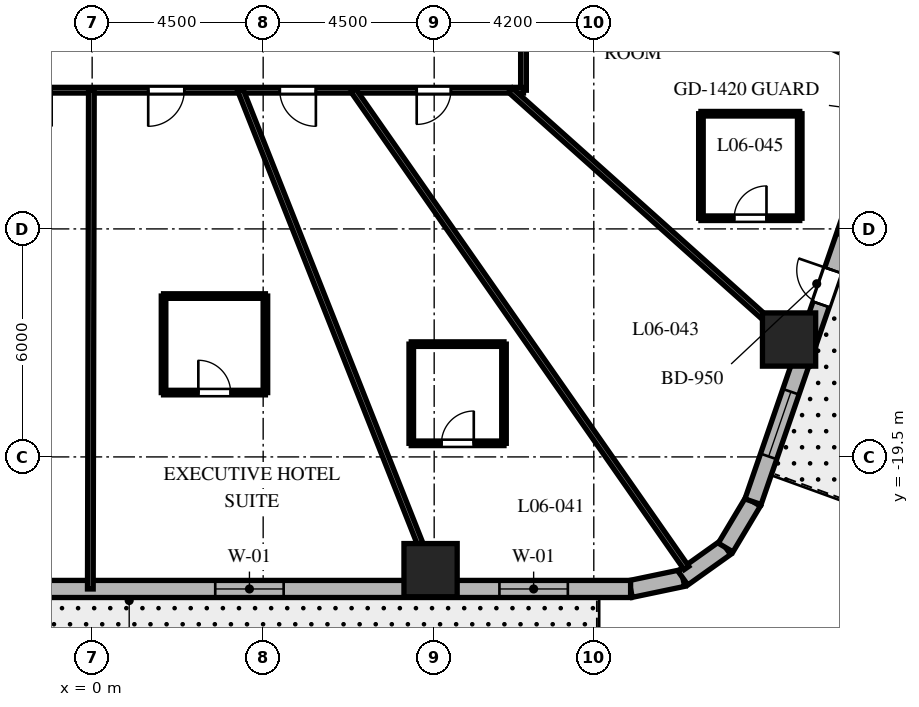
"""IFC4 building model, lengths in metres.
Left out: names, types, materials, properties, quantities, classifications, styles, units other than length and angle.
Written with IfcOpenShell. Run it as: python <this file> out.ifc"""

import sys

from ifc_helpers import new_model, si_unit, direction, frame, frame_2d, origin, origin_2d, place, context, subcontext, project, spatial, rectangle, extrude, element, fill, save


model = new_model("IFC4")
c1 = context("Model", 3, precision=1e-05, world=origin(), true_north=direction((0.0, 1.0)))
c2 = subcontext(c1, "Body", "Model", "MODEL_VIEW")
j1 = project(units=[si_unit("LENGTHUNIT", "METRE"), si_unit("PLANEANGLEUNIT", "RADIAN")], contexts=[c1])
p1 = place(None, origin())
s1 = spatial("IfcSite", under=j1, at=p1, CompositionType="ELEMENT")
p2 = place(p1, origin())
s2 = spatial("IfcBuilding", under=s1, at=p2, CompositionType="ELEMENT")
p3 = place(p2, frame((0.0, 0.0, 34.2)))
s3 = spatial("IfcBuildingStorey", under=s2, at=p3, CompositionType="ELEMENT", Elevation=34.2)
for number, where, z_axis, x_axis in (
    (1, (8.905, -22.48, 0.0), (0.0, 0.0, 1.0), (1.0, 0.0, 0.0)),
    (2, (18.338, -16.411, 0.0), (0.0, 0.0, 1.0), (1.0, 0.0, 0.0)),
):
    element("IfcColumn", number, at=place(p3, frame(where, z_axis=z_axis, x_axis=x_axis)), inside=s3, PredefinedType="COLUMN", context=c2, shape_type="SweptSolid", body=[
        extrude(rectangle(XDim=1.4, YDim=1.4, at=origin_2d()), origin(), (0.0, 0.0, 1.0), 3.7),
    ])
p4 = place(p3, frame((14.168, -22.975, 0.0), z_axis=(0.0, 0.0, 1.0), x_axis=(0.978770371074, 0.204959900243, 0.0)))
e3 = element("IfcWall", 3, at=p4, inside=s3, PredefinedType="SOLIDWALL", context=c2, shape_type="SweptSolid", body=[
    extrude(rectangle(XDim=1.406, YDim=0.45, at=frame_2d((0.703, 0.0))), origin(), (0.0, 0.0, 1.0), 3.4),
])
p5 = place(p3, frame((15.544, -22.687, 0.0), z_axis=(0.0, 0.0, 1.0), x_axis=(0.814210854316, 0.580569276412, 0.0)))
e4 = element("IfcWall", 4, at=p5, inside=s3, PredefinedType="SOLIDWALL", context=c2, shape_type="SweptSolid", body=[
    extrude(rectangle(XDim=1.381, YDim=0.45, at=frame_2d((0.691, 0.0))), origin(), (0.0, 0.0, 1.0), 3.4),
])
p6 = place(p3, frame((16.669, -21.885, 0.0), z_axis=(0.0, 0.0, 1.0), x_axis=(0.512936712947, 0.858426425799, 0.0)))
e5 = element("IfcWall", 5, at=p6, inside=s3, PredefinedType="SOLIDWALL", context=c2, shape_type="SweptSolid", body=[
    extrude(rectangle(XDim=1.406, YDim=0.45, at=frame_2d((0.703, 0.0))), origin(), (0.0, 0.0, 1.0), 3.4),
])
p7 = place(p3, frame((-12.221, -22.975, 0.0), z_axis=(0.0, 0.0, 1.0), x_axis=(1.0, 0.0, 0.0)))
e6 = element("IfcWall", 6, at=p7, inside=s3, PredefinedType="SOLIDWALL", context=c2, shape_type="SweptSolid", body=[
    extrude(rectangle(XDim=26.389, YDim=0.45, at=frame_2d((13.195, 0.0))), origin(), (0.0, 0.0, 1.0), 3.4),
])
p8 = place(p7, frame((2.799, 0.0, 0.0)))
e7 = element("IfcOpeningElement", 7, at=p8, cuts=e6, PredefinedType="OPENING", context=c2, shape_type="SweptSolid", body=[
    extrude(rectangle(XDim=1.0, YDim=2.15, at=frame_2d((0.5, 1.075))), frame((0.0, 0.235, 0.0), z_axis=(0.0, -1.0, 0.0), x_axis=(1.0, 0.0, 0.0)), (0.0, 0.0, 1.0), 0.47),
])
p9 = place(p7, frame((8.11, 0.0, 0.8)))
e8 = element("IfcOpeningElement", 8, at=p9, cuts=e6, PredefinedType="OPENING", context=c2, shape_type="SweptSolid", body=[
    extrude(rectangle(XDim=1.8, YDim=1.8, at=frame_2d((0.9, 0.9))), frame((0.0, 0.235, 0.0), z_axis=(0.0, -1.0, 0.0), x_axis=(1.0, 0.0, 0.0)), (0.0, 0.0, 1.0), 0.47),
])
p10 = place(p7, frame((15.46, 0.0, 0.8)))
e9 = element("IfcOpeningElement", 9, at=p10, cuts=e6, PredefinedType="OPENING", context=c2, shape_type="SweptSolid", body=[
    extrude(rectangle(XDim=1.8, YDim=1.8, at=frame_2d((0.9, 0.9))), frame((0.0, 0.235, 0.0), z_axis=(0.0, -1.0, 0.0), x_axis=(1.0, 0.0, 0.0)), (0.0, 0.0, 1.0), 0.47),
])
p11 = place(p7, frame((22.938, 0.0, 0.8)))
e10 = element("IfcOpeningElement", 10, at=p11, cuts=e6, PredefinedType="OPENING", context=c2, shape_type="SweptSolid", body=[
    extrude(rectangle(XDim=1.8, YDim=1.8, at=frame_2d((0.9, 0.9))), frame((0.0, 0.235, 0.0), z_axis=(0.0, -1.0, 0.0), x_axis=(1.0, 0.0, 0.0)), (0.0, 0.0, 1.0), 0.47),
])
p12 = place(p3, frame((17.39, -20.678, 0.0), z_axis=(0.0, 0.0, 1.0), x_axis=(0.326068018294, 0.945346310854, 0.0)))
e11 = element("IfcWall", 11, at=p12, inside=s3, PredefinedType="SOLIDWALL", context=c2, shape_type="SweptSolid", body=[
    extrude(rectangle(XDim=21.793, YDim=0.45, at=frame_2d((10.896, 0.0))), origin(), (0.0, 0.0, 1.0), 3.4),
])
p13 = place(p12, frame((5.493, 0.0, 0.0)))
e12 = element("IfcOpeningElement", 12, at=p13, cuts=e11, PredefinedType="OPENING", context=c2, shape_type="SweptSolid", body=[
    extrude(rectangle(XDim=0.95, YDim=2.15, at=frame_2d((0.475, 1.075))), frame((0.0, 0.235, 0.0), z_axis=(0.0, -1.0, 0.0), x_axis=(1.0, 0.0, 0.0)), (0.0, 0.0, 1.0), 0.47),
])
p14 = place(p12, frame((1.26, 0.0, 0.8)))
e13 = element("IfcOpeningElement", 13, at=p14, cuts=e11, PredefinedType="OPENING", context=c2, shape_type="SweptSolid", body=[
    extrude(rectangle(XDim=1.8, YDim=1.8, at=frame_2d((0.9, 0.9))), frame((0.0, 0.235, 0.0), z_axis=(0.0, -1.0, 0.0), x_axis=(1.0, 0.0, 0.0)), (0.0, 0.0, 1.0), 0.47),
])
p15 = place(p12, frame((7.363, 0.0, 0.8)))
e14 = element("IfcOpeningElement", 14, at=p15, cuts=e11, PredefinedType="OPENING", context=c2, shape_type="SweptSolid", body=[
    extrude(rectangle(XDim=1.8, YDim=1.8, at=frame_2d((0.9, 0.9))), frame((0.0, 0.235, 0.0), z_axis=(0.0, -1.0, 0.0), x_axis=(1.0, 0.0, 0.0)), (0.0, 0.0, 1.0), 0.47),
])
p16 = place(p12, frame((13.518, 0.0, 0.8)))
e15 = element("IfcOpeningElement", 15, at=p16, cuts=e11, PredefinedType="OPENING", context=c2, shape_type="SweptSolid", body=[
    extrude(rectangle(XDim=1.8, YDim=1.8, at=frame_2d((0.9, 0.9))), frame((0.0, 0.235, 0.0), z_axis=(0.0, -1.0, 0.0), x_axis=(1.0, 0.0, 0.0)), (0.0, 0.0, 1.0), 0.47),
])
p17 = place(p12, frame((18.68, 0.0, 0.8)))
e16 = element("IfcOpeningElement", 16, at=p17, cuts=e11, PredefinedType="OPENING", context=c2, shape_type="SweptSolid", body=[
    extrude(rectangle(XDim=1.8, YDim=1.8, at=frame_2d((0.9, 0.9))), frame((0.0, 0.235, 0.0), z_axis=(0.0, -1.0, 0.0), x_axis=(1.0, 0.0, 0.0)), (0.0, 0.0, 1.0), 0.47),
])
p18 = place(p3, frame((11.35, 9.85, 0.0), z_axis=(0.0, 0.0, 1.0), x_axis=(0.0, -1.0, 0.0)))
e17 = element("IfcWall", 17, at=p18, inside=s3, PredefinedType="PARTITIONING", context=c2, shape_type="SweptSolid", body=[
    extrude(rectangle(XDim=19.7, YDim=0.15, at=frame_2d((9.85, 0.0))), origin(), (0.0, 0.0, 1.0), 2.84),
])
p19 = place(p18, frame((4.461, 0.0, 0.0)))
e18 = element("IfcOpeningElement", 18, at=p19, cuts=e17, PredefinedType="OPENING", context=c2, shape_type="SweptSolid", body=[
    extrude(rectangle(XDim=0.95, YDim=2.03, at=frame_2d((0.475, 1.015))), frame((0.0, 0.085, 0.0), z_axis=(0.0, -1.0, 0.0), x_axis=(1.0, 0.0, 0.0)), (0.0, 0.0, 1.0), 0.17),
])
p20 = place(p18, frame((1.221, 0.0, 0.0)))
e19 = element("IfcOpeningElement", 19, at=p20, cuts=e17, PredefinedType="OPENING", context=c2, shape_type="SweptSolid", body=[
    extrude(rectangle(XDim=0.95, YDim=2.03, at=frame_2d((0.475, 1.015))), frame((0.0, 0.085, 0.0), z_axis=(0.0, -1.0, 0.0), x_axis=(1.0, 0.0, 0.0)), (0.0, 0.0, 1.0), 0.17),
])
p21 = place(p18, frame((16.714, 0.0, 0.0)))
e20 = element("IfcOpeningElement", 20, at=p21, cuts=e17, PredefinedType="OPENING", context=c2, shape_type="SweptSolid", body=[
    extrude(rectangle(XDim=0.95, YDim=2.03, at=frame_2d((0.475, 1.015))), frame((0.0, 0.085, 0.0), z_axis=(0.0, -1.0, 0.0), x_axis=(1.0, 0.0, 0.0)), (0.0, 0.0, 1.0), 0.17),
])
p22 = place(p18, frame((12.932, 0.0, 0.0)))
e21 = element("IfcOpeningElement", 21, at=p22, cuts=e17, PredefinedType="OPENING", context=c2, shape_type="SweptSolid", body=[
    extrude(rectangle(XDim=0.95, YDim=2.03, at=frame_2d((0.475, 1.015))), frame((0.0, 0.085, 0.0), z_axis=(0.0, -1.0, 0.0), x_axis=(1.0, 0.0, 0.0)), (0.0, 0.0, 1.0), 0.17),
])
p23 = place(p18, frame((8.838, 0.0, 0.0)))
e22 = element("IfcOpeningElement", 22, at=p23, cuts=e17, PredefinedType="OPENING", context=c2, shape_type="SweptSolid", body=[
    extrude(rectangle(XDim=0.95, YDim=2.03, at=frame_2d((0.475, 1.015))), frame((0.0, 0.085, 0.0), z_axis=(0.0, -1.0, 0.0), x_axis=(1.0, 0.0, 0.0)), (0.0, 0.0, 1.0), 0.17),
])
p24 = place(p3, frame((11.35, -9.85, 0.0), z_axis=(0.0, 0.0, 1.0), x_axis=(-1.0, 0.0, 0.0)))
e23 = element("IfcWall", 23, at=p24, inside=s3, PredefinedType="PARTITIONING", context=c2, shape_type="SweptSolid", body=[
    extrude(rectangle(XDim=22.7, YDim=0.15, at=frame_2d((11.35, 0.0))), origin(), (0.0, 0.0, 1.0), 2.84),
])
p25 = place(p24, frame((18.436, 0.0, 0.0)))
e24 = element("IfcOpeningElement", 24, at=p25, cuts=e23, PredefinedType="OPENING", context=c2, shape_type="SweptSolid", body=[
    extrude(rectangle(XDim=0.95, YDim=2.03, at=frame_2d((0.475, 1.015))), frame((0.0, 0.085, 0.0), z_axis=(0.0, -1.0, 0.0), x_axis=(1.0, 0.0, 0.0)), (0.0, 0.0, 1.0), 0.17),
])
p26 = place(p24, frame((15.176, 0.0, 0.0)))
e25 = element("IfcOpeningElement", 25, at=p26, cuts=e23, PredefinedType="OPENING", context=c2, shape_type="SweptSolid", body=[
    extrude(rectangle(XDim=0.9, YDim=2.03, at=frame_2d((0.45, 1.015))), frame((0.0, 0.085, 0.0), z_axis=(0.0, -1.0, 0.0), x_axis=(1.0, 0.0, 0.0)), (0.0, 0.0, 1.0), 0.17),
])
p27 = place(p24, frame((12.415, 0.0, 0.0)))
e26 = element("IfcOpeningElement", 26, at=p27, cuts=e23, PredefinedType="OPENING", context=c2, shape_type="SweptSolid", body=[
    extrude(rectangle(XDim=0.95, YDim=2.03, at=frame_2d((0.475, 1.015))), frame((0.0, 0.085, 0.0), z_axis=(0.0, -1.0, 0.0), x_axis=(1.0, 0.0, 0.0)), (0.0, 0.0, 1.0), 0.17),
])
p28 = place(p24, frame((8.925, 0.0, 0.0)))
e27 = element("IfcOpeningElement", 27, at=p28, cuts=e23, PredefinedType="OPENING", context=c2, shape_type="SweptSolid", body=[
    extrude(rectangle(XDim=0.95, YDim=2.03, at=frame_2d((0.475, 1.015))), frame((0.0, 0.085, 0.0), z_axis=(0.0, -1.0, 0.0), x_axis=(1.0, 0.0, 0.0)), (0.0, 0.0, 1.0), 0.17),
])
p29 = place(p24, frame((5.463, 0.0, 0.0)))
e28 = element("IfcOpeningElement", 28, at=p29, cuts=e23, PredefinedType="OPENING", context=c2, shape_type="SweptSolid", body=[
    extrude(rectangle(XDim=0.95, YDim=2.03, at=frame_2d((0.475, 1.015))), frame((0.0, 0.085, 0.0), z_axis=(0.0, -1.0, 0.0), x_axis=(1.0, 0.0, 0.0)), (0.0, 0.0, 1.0), 0.17),
])
p30 = place(p24, frame((1.91, 0.0, 0.0)))
e29 = element("IfcOpeningElement", 29, at=p30, cuts=e23, PredefinedType="OPENING", context=c2, shape_type="SweptSolid", body=[
    extrude(rectangle(XDim=0.9, YDim=2.03, at=frame_2d((0.45, 1.015))), frame((0.0, 0.085, 0.0), z_axis=(0.0, -1.0, 0.0), x_axis=(1.0, 0.0, 0.0)), (0.0, 0.0, 1.0), 0.17),
])
p31 = place(p3, frame((-0.021, -9.85, 0.0), z_axis=(0.0, 0.0, 1.0), x_axis=(-0.002064727742, -0.999997868447, 0.0)))
e30 = element("IfcWall", 30, at=p31, inside=s3, PredefinedType="PARTITIONING", context=c2, shape_type="SweptSolid", body=[
    extrude(rectangle(XDim=13.125, YDim=0.15, at=frame_2d((6.562, 0.0))), origin(), (0.0, 0.0, 1.0), 2.54),
])
p32 = place(p3, frame((3.902, -9.85, 0.0), z_axis=(0.0, 0.0, 1.0), x_axis=(0.36828765711, -0.929711891728, 0.0)))
e31 = element("IfcWall", 31, at=p32, inside=s3, PredefinedType="PARTITIONING", context=c2, shape_type="SweptSolid", body=[
    extrude(rectangle(XDim=14.117, YDim=0.15, at=frame_2d((7.059, 0.0))), origin(), (0.0, 0.0, 1.0), 2.54),
])
p33 = place(p3, frame((6.869, -9.85, 0.0), z_axis=(0.0, 0.0, 1.0), x_axis=(0.572039834497, -0.820225839479, 0.0)))
e32 = element("IfcWall", 32, at=p33, inside=s3, PredefinedType="PARTITIONING", context=c2, shape_type="SweptSolid", body=[
    extrude(rectangle(XDim=15.329, YDim=0.15, at=frame_2d((7.665, 0.0))), origin(), (0.0, 0.0, 1.0), 2.54),
])
p34 = place(p3, frame((11.007, -9.85, 0.0), z_axis=(0.0, 0.0, 1.0), x_axis=(0.745177305978, -0.666866390407, 0.0)))
e33 = element("IfcWall", 33, at=p34, inside=s3, PredefinedType="PARTITIONING", context=c2, shape_type="SweptSolid", body=[
    extrude(rectangle(XDim=10.375, YDim=0.15, at=frame_2d((5.188, 0.0))), origin(), (0.0, 0.0, 1.0), 2.54),
])
p35 = place(p3, frame((11.35, -5.068, 0.0), z_axis=(0.0, 0.0, 1.0), x_axis=(0.913107192911, -0.407719577963, 0.0)))
e34 = element("IfcWall", 34, at=p35, inside=s3, PredefinedType="PARTITIONING", context=c2, shape_type="SweptSolid", body=[
    extrude(rectangle(XDim=10.841, YDim=0.15, at=frame_2d((5.421, 0.0))), origin(), (0.0, 0.0, 1.0), 2.54),
])
p36 = place(p3, frame((1.879, -17.807, 0.0), z_axis=(0.0, 0.0, 1.0), x_axis=(1.0, 0.0, 0.0)))
e35 = element("IfcWall", 35, at=p36, inside=s3, PredefinedType="PARTITIONING", context=c2, shape_type="SweptSolid", body=[
    extrude(rectangle(XDim=2.68, YDim=0.12, at=frame_2d((1.34, 0.0))), origin(), (0.0, 0.0, 1.0), 2.841),
])
p37 = place(p36, frame((0.915, 0.0, 0.0)))
e36 = element("IfcOpeningElement", 36, at=p37, cuts=e35, PredefinedType="OPENING", context=c2, shape_type="SweptSolid", body=[
    extrude(rectangle(XDim=0.85, YDim=2.03, at=frame_2d((0.425, 1.015))), frame((0.0, 0.07, 0.0), z_axis=(0.0, -1.0, 0.0), x_axis=(1.0, 0.0, 0.0)), (0.0, 0.0, 1.0), 0.14),
])
p38 = place(p3, frame((4.559, -17.807, 0.0), z_axis=(0.0, 0.0, 1.0), x_axis=(0.0, 1.0, 0.0)))
e37 = element("IfcWall", 37, at=p38, inside=s3, PredefinedType="PARTITIONING", context=c2, shape_type="SweptSolid", body=[
    extrude(rectangle(XDim=2.54, YDim=0.12, at=frame_2d((1.27, 0.0))), origin(), (0.0, 0.0, 1.0), 2.841),
])
p39 = place(p3, frame((4.559, -15.267, 0.0), z_axis=(0.0, 0.0, 1.0), x_axis=(-1.0, 0.0, 0.0)))
e38 = element("IfcWall", 38, at=p39, inside=s3, PredefinedType="PARTITIONING", context=c2, shape_type="SweptSolid", body=[
    extrude(rectangle(XDim=2.68, YDim=0.12, at=frame_2d((1.34, 0.0))), origin(), (0.0, 0.0, 1.0), 3.4),
])
p40 = place(p3, frame((1.879, -15.267, 0.0), z_axis=(0.0, 0.0, 1.0), x_axis=(0.0, -1.0, 0.0)))
e39 = element("IfcWall", 39, at=p40, inside=s3, PredefinedType="PARTITIONING", context=c2, shape_type="SweptSolid", body=[
    extrude(rectangle(XDim=2.54, YDim=0.12, at=frame_2d((1.27, 0.0))), origin(), (0.0, 0.0, 1.0), 2.841),
])
p41 = place(p3, frame((8.397, -19.142, 0.0), z_axis=(0.0, 0.0, 1.0), x_axis=(1.0, 0.0, 0.0)))
e40 = element("IfcWall", 40, at=p41, inside=s3, PredefinedType="PARTITIONING", context=c2, shape_type="SweptSolid", body=[
    extrude(rectangle(XDim=2.44, YDim=0.12, at=frame_2d((1.22, 0.0))), origin(), (0.0, 0.0, 1.0), 2.84),
])
p42 = place(p41, frame((0.795, 0.0, 0.0)))
e41 = element("IfcOpeningElement", 41, at=p42, cuts=e40, PredefinedType="OPENING", context=c2, shape_type="SweptSolid", body=[
    extrude(rectangle(XDim=0.85, YDim=2.03, at=frame_2d((0.425, 1.015))), frame((0.0, 0.07, 0.0), z_axis=(0.0, -1.0, 0.0), x_axis=(1.0, 0.0, 0.0)), (0.0, 0.0, 1.0), 0.14),
])
p43 = place(p3, frame((10.837, -19.142, 0.0), z_axis=(0.0, 0.0, 1.0), x_axis=(0.0, 1.0, 0.0)))
e42 = element("IfcWall", 42, at=p43, inside=s3, PredefinedType="PARTITIONING", context=c2, shape_type="SweptSolid", body=[
    extrude(rectangle(XDim=2.61, YDim=0.12, at=frame_2d((1.305, 0.0))), origin(), (0.0, 0.0, 1.0), 2.927),
])
p44 = place(p3, frame((10.837, -16.532, 0.0), z_axis=(0.0, 0.0, 1.0), x_axis=(-1.0, 0.0, 0.0)))
e43 = element("IfcWall", 43, at=p44, inside=s3, PredefinedType="PARTITIONING", context=c2, shape_type="SweptSolid", body=[
    extrude(rectangle(XDim=2.44, YDim=0.12, at=frame_2d((1.22, 0.0))), origin(), (0.0, 0.0, 1.0), 2.84),
])
p45 = place(p3, frame((8.397, -16.532, 0.0), z_axis=(0.0, 0.0, 1.0), x_axis=(0.0, -1.0, 0.0)))
e44 = element("IfcWall", 44, at=p45, inside=s3, PredefinedType="PARTITIONING", context=c2, shape_type="SweptSolid", body=[
    extrude(rectangle(XDim=2.61, YDim=0.12, at=frame_2d((1.305, 0.0))), origin(), (0.0, 0.0, 1.0), 2.841),
])
p46 = place(p3, frame((16.019, -13.219, 0.0), z_axis=(0.0, 0.0, 1.0), x_axis=(1.0, 0.0, 0.0)))
e45 = element("IfcWall", 45, at=p46, inside=s3, PredefinedType="PARTITIONING", context=c2, shape_type="SweptSolid", body=[
    extrude(rectangle(XDim=2.6, YDim=0.12, at=frame_2d((1.3, 0.0))), origin(), (0.0, 0.0, 1.0), 3.4),
])
p47 = place(p46, frame((0.875, 0.0, 0.0)))
e46 = element("IfcOpeningElement", 46, at=p47, cuts=e45, PredefinedType="OPENING", context=c2, shape_type="SweptSolid", body=[
    extrude(rectangle(XDim=0.85, YDim=2.03, at=frame_2d((0.425, 1.015))), frame((0.0, 0.07, 0.0), z_axis=(0.0, -1.0, 0.0), x_axis=(1.0, 0.0, 0.0)), (0.0, 0.0, 1.0), 0.14),
])
p48 = place(p3, frame((18.619, -13.219, 0.0), z_axis=(0.0, 0.0, 1.0), x_axis=(0.0, 1.0, 0.0)))
e47 = element("IfcWall", 47, at=p48, inside=s3, PredefinedType="PARTITIONING", context=c2, shape_type="SweptSolid", body=[
    extrude(rectangle(XDim=2.75, YDim=0.12, at=frame_2d((1.375, 0.0))), origin(), (0.0, 0.0, 1.0), 3.4),
])
p49 = place(p3, frame((18.619, -10.469, 0.0), z_axis=(0.0, 0.0, 1.0), x_axis=(-1.0, 0.0, 0.0)))
e48 = element("IfcWall", 48, at=p49, inside=s3, PredefinedType="PARTITIONING", context=c2, shape_type="SweptSolid", body=[
    extrude(rectangle(XDim=2.6, YDim=0.12, at=frame_2d((1.3, 0.0))), origin(), (0.0, 0.0, 1.0), 2.972),
])
p50 = place(p3, frame((16.019, -10.469, 0.0), z_axis=(0.0, 0.0, 1.0), x_axis=(0.0, -1.0, 0.0)))
e49 = element("IfcWall", 49, at=p50, inside=s3, PredefinedType="PARTITIONING", context=c2, shape_type="SweptSolid", body=[
    extrude(rectangle(XDim=2.75, YDim=0.12, at=frame_2d((1.375, 0.0))), origin(), (0.0, 0.0, 1.0), 2.972),
])
p51 = place(p10, origin())
e50 = element("IfcWindow", 50, at=p51, inside=s3, PartitioningType="SINGLE_PANEL", PredefinedType="WINDOW", context=c2, shape_type="SweptSolid", body=[
    extrude(rectangle(XDim=1.8, YDim=1.8, at=frame_2d((0.9, 0.9))), frame((0.0, 0.03, 0.0), z_axis=(0.0, -1.0, 0.0), x_axis=(1.0, 0.0, 0.0)), (0.0, 0.0, 1.0), 0.06),
])
fill(e9, e50)
p52 = place(p11, origin())
e51 = element("IfcWindow", 51, at=p52, inside=s3, PartitioningType="SINGLE_PANEL", PredefinedType="WINDOW", context=c2, shape_type="SweptSolid", body=[
    extrude(rectangle(XDim=1.8, YDim=1.8, at=frame_2d((0.9, 0.9))), frame((0.0, 0.03, 0.0), z_axis=(0.0, -1.0, 0.0), x_axis=(1.0, 0.0, 0.0)), (0.0, 0.0, 1.0), 0.06),
])
fill(e10, e51)
p53 = place(p13, origin())
e52 = element("IfcDoor", 52, at=p53, inside=s3, OperationType="SINGLE_SWING_RIGHT", PredefinedType="DOOR", context=c2, shape_type="SweptSolid", body=[
    extrude(rectangle(XDim=0.95, YDim=2.15, at=frame_2d((0.475, 1.075))), frame((0.0, 0.025, 0.0), z_axis=(0.0, -1.0, 0.0), x_axis=(1.0, 0.0, 0.0)), (0.0, 0.0, 1.0), 0.05),
])
fill(e12, e52)
p54 = place(p14, origin())
e53 = element("IfcWindow", 53, at=p54, inside=s3, PartitioningType="SINGLE_PANEL", PredefinedType="WINDOW", context=c2, shape_type="SweptSolid", body=[
    extrude(rectangle(XDim=1.8, YDim=1.8, at=frame_2d((0.9, 0.9))), frame((0.0, 0.03, 0.0), z_axis=(0.0, -1.0, 0.0), x_axis=(1.0, 0.0, 0.0)), (0.0, 0.0, 1.0), 0.06),
])
fill(e13, e53)
p55 = place(p28, origin())
e54 = element("IfcDoor", 54, at=p55, inside=s3, OperationType="SINGLE_SWING_RIGHT", PredefinedType="DOOR", context=c2, shape_type="SweptSolid", body=[
    extrude(rectangle(XDim=0.95, YDim=2.03, at=frame_2d((0.475, 1.015))), frame((0.0, 0.025, 0.0), z_axis=(0.0, -1.0, 0.0), x_axis=(1.0, 0.0, 0.0)), (0.0, 0.0, 1.0), 0.05),
])
fill(e27, e54)
p56 = place(p37, origin())
e55 = element("IfcDoor", 55, at=p56, inside=s3, OperationType="SINGLE_SWING_LEFT", PredefinedType="DOOR", context=c2, shape_type="SweptSolid", body=[
    extrude(rectangle(XDim=0.85, YDim=2.03, at=frame_2d((0.425, 1.015))), frame((0.0, 0.025, 0.0), z_axis=(0.0, -1.0, 0.0), x_axis=(1.0, 0.0, 0.0)), (0.0, 0.0, 1.0), 0.05),
])
fill(e36, e55)
p57 = place(p29, origin())
e56 = element("IfcDoor", 56, at=p57, inside=s3, OperationType="SINGLE_SWING_LEFT", PredefinedType="DOOR", context=c2, shape_type="SweptSolid", body=[
    extrude(rectangle(XDim=0.95, YDim=2.03, at=frame_2d((0.475, 1.015))), frame((0.0, 0.025, 0.0), z_axis=(0.0, -1.0, 0.0), x_axis=(1.0, 0.0, 0.0)), (0.0, 0.0, 1.0), 0.05),
])
fill(e28, e56)
p58 = place(p42, origin())
e57 = element("IfcDoor", 57, at=p58, inside=s3, OperationType="SINGLE_SWING_RIGHT", PredefinedType="DOOR", context=c2, shape_type="SweptSolid", body=[
    extrude(rectangle(XDim=0.85, YDim=2.03, at=frame_2d((0.425, 1.015))), frame((0.0, 0.025, 0.0), z_axis=(0.0, -1.0, 0.0), x_axis=(1.0, 0.0, 0.0)), (0.0, 0.0, 1.0), 0.05),
])
fill(e41, e57)
p59 = place(p30, origin())
e58 = element("IfcDoor", 58, at=p59, inside=s3, OperationType="SINGLE_SWING_RIGHT", PredefinedType="DOOR", context=c2, shape_type="SweptSolid", body=[
    extrude(rectangle(XDim=0.9, YDim=2.03, at=frame_2d((0.45, 1.015))), frame((0.0, 0.025, 0.0), z_axis=(0.0, -1.0, 0.0), x_axis=(1.0, 0.0, 0.0)), (0.0, 0.0, 1.0), 0.05),
])
fill(e29, e58)
p60 = place(p47, origin())
e59 = element("IfcDoor", 59, at=p60, inside=s3, OperationType="SINGLE_SWING_RIGHT", PredefinedType="DOOR", context=c2, shape_type="SweptSolid", body=[
    extrude(rectangle(XDim=0.85, YDim=2.03, at=frame_2d((0.425, 1.015))), frame((0.0, 0.025, 0.0), z_axis=(0.0, -1.0, 0.0), x_axis=(1.0, 0.0, 0.0)), (0.0, 0.0, 1.0), 0.05),
])
fill(e46, e59)
save(model, sys.argv[1])
